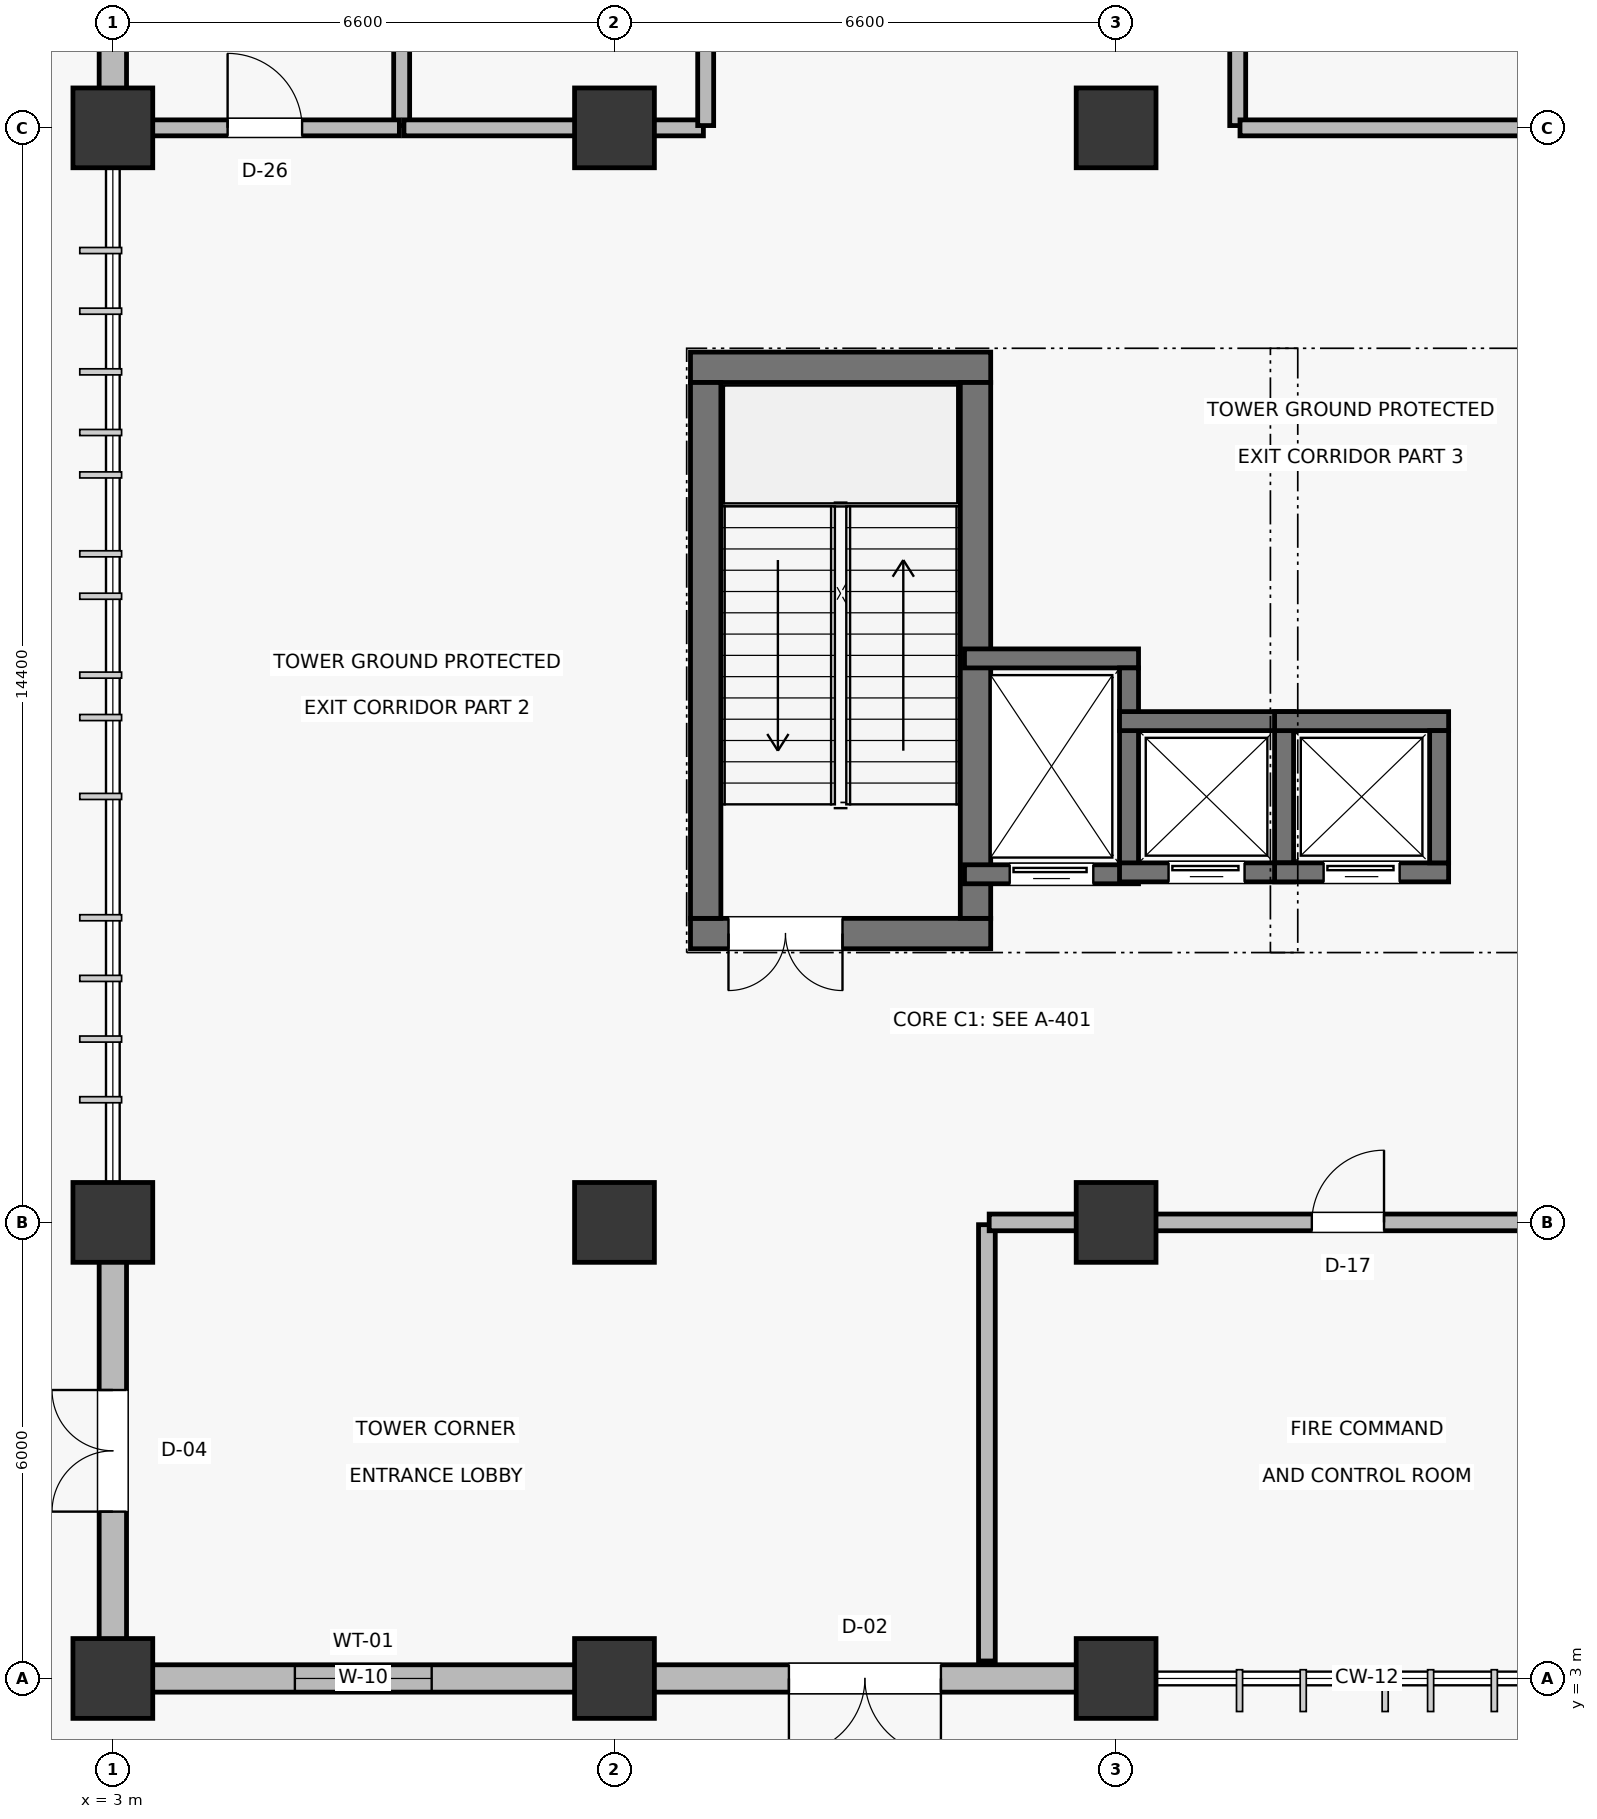
"""IFC4 building model, lengths in metres.
Left out: names, types, materials, properties, quantities, classifications, styles, units other than length and angle.
Written with IfcOpenShell. Run it as: python <this file> out.ifc"""

import sys

from ifc_helpers import new_model, si_unit, direction, frame, frame_2d, origin, origin_2d, place, context, subcontext, project, spatial, rectangle, extrude, element, fill, save


model = new_model("IFC4")
c1 = context("Model", 3, precision=1e-05, world=origin(), true_north=direction((0.0, 1.0)))
c2 = subcontext(c1, "Body", "Model", "MODEL_VIEW")
j1 = project(units=[si_unit("LENGTHUNIT", "METRE"), si_unit("PLANEANGLEUNIT", "RADIAN")], contexts=[c1])
p1 = place(None, origin())
s1 = spatial("IfcSite", under=j1, at=p1, CompositionType="ELEMENT")
p2 = place(p1, origin())
s2 = spatial("IfcBuilding", under=s1, at=p2, CompositionType="ELEMENT")
p3 = place(p2, origin())
s3 = spatial("IfcBuildingStorey", under=s2, at=p3, CompositionType="ELEMENT", Elevation=0.0)
for number, where, z_axis, x_axis in (
    (1, (3.0, 3.0, 0.0), (0.0, 0.0, 1.0), (1.0, 0.0, 0.0)),
    (2, (3.0, 9.0, 0.0), (0.0, 0.0, 1.0), (1.0, 0.0, 0.0)),
    (3, (3.0, 23.4, 0.0), (0.0, 0.0, 1.0), (1.0, 0.0, 0.0)),
    (4, (9.6, 3.0, 0.0), (0.0, 0.0, 1.0), (1.0, 0.0, 0.0)),
    (5, (9.6, 9.0, 0.0), (0.0, 0.0, 1.0), (1.0, 0.0, 0.0)),
    (6, (9.6, 23.4, 0.0), (0.0, 0.0, 1.0), (1.0, 0.0, 0.0)),
    (7, (16.2, 3.0, 0.0), (0.0, 0.0, 1.0), (1.0, 0.0, 0.0)),
    (8, (16.2, 9.0, 0.0), (0.0, 0.0, 1.0), (1.0, 0.0, 0.0)),
    (9, (16.2, 23.4, 0.0), (0.0, 0.0, 1.0), (1.0, 0.0, 0.0)),
):
    element("IfcColumn", number, at=place(p3, frame(where, z_axis=z_axis, x_axis=x_axis)), inside=s3, PredefinedType="COLUMN", context=c2, shape_type="SweptSolid", body=[
        extrude(rectangle(XDim=1.05, YDim=1.05, at=origin_2d()), origin(), (0.0, 0.0, 1.0), 5.4),
    ])
p4 = place(p3, frame((3.505, 3.0, 0.0), z_axis=(0.0, 0.0, 1.0), x_axis=(1.0, 0.0, 0.0)))
e10 = element("IfcWall", 10, at=p4, inside=s3, PredefinedType="SOLIDWALL", context=c2, shape_type="SweptSolid", body=[
    extrude(rectangle(XDim=5.58, YDim=0.36, at=frame_2d((2.79, 0.0))), origin(), (0.0, 0.0, 1.0), 2.87),
])
p5 = place(p4, frame((1.89, 0.0, 0.9)))
e11 = element("IfcOpeningElement", 11, at=p5, cuts=e10, PredefinedType="OPENING", context=c2, shape_type="SweptSolid", body=[
    extrude(rectangle(XDim=1.8, YDim=1.75, at=frame_2d((0.9, 0.875))), frame((0.0, 0.19, 0.0), z_axis=(0.0, -1.0, 0.0), x_axis=(1.0, 0.0, 0.0)), (0.0, 0.0, 1.0), 0.38),
])
p6 = place(p3, frame((10.105, 3.0, 0.0), z_axis=(0.0, 0.0, 1.0), x_axis=(1.0, 0.0, 0.0)))
e12 = element("IfcWall", 12, at=p6, inside=s3, PredefinedType="SOLIDWALL", context=c2, shape_type="SweptSolid", body=[
    extrude(rectangle(XDim=5.58, YDim=0.36, at=frame_2d((2.79, 0.0))), origin(), (0.0, 0.0, 1.0), 4.475),
])
p7 = place(p6, frame((1.79, 0.0, 0.0)))
e13 = element("IfcOpeningElement", 13, at=p7, cuts=e12, PredefinedType="OPENING", context=c2, shape_type="SweptSolid", body=[
    extrude(rectangle(XDim=2.0, YDim=2.4, at=frame_2d((1.0, 1.2))), frame((0.0, 0.19, 0.0), z_axis=(0.0, -1.0, 0.0), x_axis=(1.0, 0.0, 0.0)), (0.0, 0.0, 1.0), 0.38),
])
p8 = place(p3, frame((3.0, 3.505, 0.0), z_axis=(0.0, 0.0, 1.0), x_axis=(0.0, 1.0, 0.0)))
e14 = element("IfcWall", 14, at=p8, inside=s3, PredefinedType="SOLIDWALL", context=c2, shape_type="SweptSolid", body=[
    extrude(rectangle(XDim=4.98, YDim=0.36, at=frame_2d((2.49, 0.0))), origin(), (0.0, 0.0, 1.0), 4.475),
])
p9 = place(p8, frame((1.69, 0.0, 0.0)))
e15 = element("IfcOpeningElement", 15, at=p9, cuts=e14, PredefinedType="OPENING", context=c2, shape_type="SweptSolid", body=[
    extrude(rectangle(XDim=1.6, YDim=2.25, at=frame_2d((0.8, 1.125))), frame((0.0, 0.19, 0.0), z_axis=(0.0, -1.0, 0.0), x_axis=(1.0, 0.0, 0.0)), (0.0, 0.0, 1.0), 0.38),
])
p10 = place(p3, frame((3.0, 23.905, 0.0), z_axis=(0.0, 0.0, 1.0), x_axis=(0.0, 1.0, 0.0)))
e16 = element("IfcWall", 16, at=p10, inside=s3, PredefinedType="SOLIDWALL", context=c2, shape_type="SweptSolid", body=[
    extrude(rectangle(XDim=5.59, YDim=0.36, at=frame_2d((2.795, 0.0))), origin(), (0.0, 0.0, 1.0), 4.475),
])
p11 = place(p10, frame((1.67, 0.0, 0.9)))
e17 = element("IfcOpeningElement", 17, at=p11, cuts=e16, PredefinedType="OPENING", context=c2, shape_type="SweptSolid", body=[
    extrude(rectangle(XDim=2.25, YDim=1.85, at=frame_2d((1.125, 0.925))), frame((0.0, 0.19, 0.0), z_axis=(0.0, -1.0, 0.0), x_axis=(1.0, 0.0, 0.0)), (0.0, 0.0, 1.0), 0.38),
])
p12 = place(p3, frame((10.6, 12.8, 0.0), z_axis=(0.0, 0.0, 1.0), x_axis=(1.0, 0.0, 0.0)))
e18 = element("IfcWall", 18, at=p12, inside=s3, PredefinedType="SHEAR", context=c2, shape_type="SweptSolid", body=[
    extrude(rectangle(XDim=3.95, YDim=0.4, at=frame_2d((1.975, 0.0))), origin(), (0.0, 0.0, 1.0), 5.18),
])
p13 = place(p12, frame((0.5, 0.0, 0.0)))
e19 = element("IfcOpeningElement", 19, at=p13, cuts=e18, PredefinedType="OPENING", context=c2, shape_type="SweptSolid", body=[
    extrude(rectangle(XDim=1.5, YDim=2.2, at=frame_2d((0.75, 1.1))), frame((0.0, 0.21, 0.0), z_axis=(0.0, -1.0, 0.0), x_axis=(1.0, 0.0, 0.0)), (0.0, 0.0, 1.0), 0.42),
])
p14 = place(p3, frame((10.6, 20.25, 0.0), z_axis=(0.0, 0.0, 1.0), x_axis=(1.0, 0.0, 0.0)))
e20 = element("IfcWall", 20, at=p14, inside=s3, PredefinedType="SHEAR", context=c2, shape_type="SweptSolid", body=[
    extrude(rectangle(XDim=3.95, YDim=0.4, at=frame_2d((1.975, 0.0))), origin(), (0.0, 0.0, 1.0), 5.18),
])
for number, where, z_axis, x_axis in (
    (21, (10.8, 13.0, 0.0), (0.0, 0.0, 1.0), (0.0, 1.0, 0.0)),
    (22, (14.35, 13.0, 0.0), (0.0, 0.0, 1.0), (0.0, 1.0, 0.0)),
):
    element("IfcWall", number, at=place(p3, frame(where, z_axis=z_axis, x_axis=x_axis)), inside=s3, PredefinedType="SHEAR", context=c2, shape_type="SweptSolid", body=[
        extrude(rectangle(XDim=7.05, YDim=0.4, at=frame_2d((3.525, 0.0))), origin(), (0.0, 0.0, 1.0), 5.18),
    ])
p15 = place(p3, frame((14.205, 13.58, 0.0), z_axis=(0.0, 0.0, 1.0), x_axis=(1.0, 0.0, 0.0)))
e23 = element("IfcWall", 23, at=p15, inside=s3, PredefinedType="SHEAR", context=c2, shape_type="SweptSolid", body=[
    extrude(rectangle(XDim=2.29, YDim=0.25, at=frame_2d((1.145, 0.0))), origin(), (0.0, 0.0, 1.0), 5.16),
])
p16 = place(p15, frame((0.595, 0.0, 0.0)))
e24 = element("IfcOpeningElement", 24, at=p16, cuts=e23, PredefinedType="OPENING", context=c2, shape_type="SweptSolid", body=[
    extrude(rectangle(XDim=1.1, YDim=2.2, at=frame_2d((0.55, 1.1))), frame((0.0, 0.135, 0.0), z_axis=(0.0, -1.0, 0.0), x_axis=(1.0, 0.0, 0.0)), (0.0, 0.0, 1.0), 0.27),
])
p17 = place(p3, frame((14.205, 16.42, 0.0), z_axis=(0.0, 0.0, 1.0), x_axis=(1.0, 0.0, 0.0)))
e25 = element("IfcWall", 25, at=p17, inside=s3, PredefinedType="SHEAR", context=c2, shape_type="SweptSolid", body=[
    extrude(rectangle(XDim=2.29, YDim=0.25, at=frame_2d((1.145, 0.0))), origin(), (0.0, 0.0, 1.0), 5.16),
])
p18 = place(p3, frame((16.37, 13.705, 0.0), z_axis=(0.0, 0.0, 1.0), x_axis=(0.0, 1.0, 0.0)))
e26 = element("IfcWall", 26, at=p18, inside=s3, PredefinedType="SHEAR", context=c2, shape_type="SweptSolid", body=[
    extrude(rectangle(XDim=2.59, YDim=0.25, at=frame_2d((1.295, 0.0))), origin(), (0.0, 0.0, 1.0), 5.16),
])
p19 = place(p3, frame((16.245, 13.605, 0.0), z_axis=(0.0, 0.0, 1.0), x_axis=(1.0, 0.0, 0.0)))
e27 = element("IfcWall", 27, at=p19, inside=s3, PredefinedType="SHEAR", context=c2, shape_type="SweptSolid", body=[
    extrude(rectangle(XDim=2.29, YDim=0.25, at=frame_2d((1.145, 0.0))), origin(), (0.0, 0.0, 1.0), 5.16),
])
p20 = place(p19, frame((0.645, 0.0, 0.0)))
e28 = element("IfcOpeningElement", 28, at=p20, cuts=e27, PredefinedType="OPENING", context=c2, shape_type="SweptSolid", body=[
    extrude(rectangle(XDim=1.0, YDim=2.15, at=frame_2d((0.5, 1.075))), frame((0.0, 0.135, 0.0), z_axis=(0.0, -1.0, 0.0), x_axis=(1.0, 0.0, 0.0)), (0.0, 0.0, 1.0), 0.27),
])
p21 = place(p3, frame((16.245, 15.595, 0.0), z_axis=(0.0, 0.0, 1.0), x_axis=(1.0, 0.0, 0.0)))
e29 = element("IfcWall", 29, at=p21, inside=s3, PredefinedType="SHEAR", context=c2, shape_type="SweptSolid", body=[
    extrude(rectangle(XDim=2.29, YDim=0.25, at=frame_2d((1.145, 0.0))), origin(), (0.0, 0.0, 1.0), 5.16),
])
p22 = place(p3, frame((18.41, 13.73, 0.0), z_axis=(0.0, 0.0, 1.0), x_axis=(0.0, 1.0, 0.0)))
e30 = element("IfcWall", 30, at=p22, inside=s3, PredefinedType="SHEAR", context=c2, shape_type="SweptSolid", body=[
    extrude(rectangle(XDim=1.74, YDim=0.25, at=frame_2d((0.87, 0.0))), origin(), (0.0, 0.0, 1.0), 5.16),
])
p23 = place(p3, frame((18.285, 13.605, 0.0), z_axis=(0.0, 0.0, 1.0), x_axis=(1.0, 0.0, 0.0)))
e31 = element("IfcWall", 31, at=p23, inside=s3, PredefinedType="SHEAR", context=c2, shape_type="SweptSolid", body=[
    extrude(rectangle(XDim=2.29, YDim=0.25, at=frame_2d((1.145, 0.0))), origin(), (0.0, 0.0, 1.0), 5.16),
])
p24 = place(p23, frame((0.645, 0.0, 0.0)))
e32 = element("IfcOpeningElement", 32, at=p24, cuts=e31, PredefinedType="OPENING", context=c2, shape_type="SweptSolid", body=[
    extrude(rectangle(XDim=1.0, YDim=2.15, at=frame_2d((0.5, 1.075))), frame((0.0, 0.135, 0.0), z_axis=(0.0, -1.0, 0.0), x_axis=(1.0, 0.0, 0.0)), (0.0, 0.0, 1.0), 0.27),
])
p25 = place(p3, frame((18.285, 15.595, 0.0), z_axis=(0.0, 0.0, 1.0), x_axis=(1.0, 0.0, 0.0)))
e33 = element("IfcWall", 33, at=p25, inside=s3, PredefinedType="SHEAR", context=c2, shape_type="SweptSolid", body=[
    extrude(rectangle(XDim=2.29, YDim=0.25, at=frame_2d((1.145, 0.0))), origin(), (0.0, 0.0, 1.0), 5.16),
])
p26 = place(p3, frame((20.45, 13.73, 0.0), z_axis=(0.0, 0.0, 1.0), x_axis=(0.0, 1.0, 0.0)))
e34 = element("IfcWall", 34, at=p26, inside=s3, PredefinedType="SHEAR", context=c2, shape_type="SweptSolid", body=[
    extrude(rectangle(XDim=1.74, YDim=0.25, at=frame_2d((0.87, 0.0))), origin(), (0.0, 0.0, 1.0), 5.16),
])
p27 = place(p3, frame((14.5, 3.23, 0.0), z_axis=(0.0, 0.0, 1.0), x_axis=(0.0, 1.0, 0.0)))
e35 = element("IfcWall", 35, at=p27, inside=s3, PredefinedType="PARTITIONING", context=c2, shape_type="SweptSolid", body=[
    extrude(rectangle(XDim=5.74, YDim=0.22, at=frame_2d((2.87, 0.0))), origin(), (0.0, 0.0, 1.0), 4.425),
])
p28 = place(p3, frame((14.53, 9.0, 0.0), z_axis=(0.0, 0.0, 1.0), x_axis=(1.0, 0.0, 0.0)))
e36 = element("IfcWall", 36, at=p28, inside=s3, PredefinedType="PARTITIONING", context=c2, shape_type="SweptSolid", body=[
    extrude(rectangle(XDim=9.44, YDim=0.22, at=frame_2d((4.72, 0.0))), origin(), (0.0, 0.0, 1.0), 4.255),
])
p29 = place(p28, frame((4.245, 0.0, 0.0)))
e37 = element("IfcOpeningElement", 37, at=p29, cuts=e36, PredefinedType="OPENING", context=c2, shape_type="SweptSolid", body=[
    extrude(rectangle(XDim=0.95, YDim=2.15, at=frame_2d((0.475, 1.075))), frame((0.0, 0.12, 0.0), z_axis=(0.0, -1.0, 0.0), x_axis=(1.0, 0.0, 0.0)), (0.0, 0.0, 1.0), 0.24),
])
p30 = place(p3, frame((6.8, 23.43, 0.0), z_axis=(0.0, 0.0, 1.0), x_axis=(0.0, 1.0, 0.0)))
e38 = element("IfcWall", 38, at=p30, inside=s3, PredefinedType="PLUMBINGWALL", context=c2, shape_type="SweptSolid", body=[
    extrude(rectangle(XDim=6.54, YDim=0.21, at=frame_2d((3.27, 0.0))), origin(), (0.0, 0.0, 1.0), 4.325),
])
p31 = place(p3, frame((3.23, 23.4, 0.0), z_axis=(0.0, 0.0, 1.0), x_axis=(1.0, 0.0, 0.0)))
e39 = element("IfcWall", 39, at=p31, inside=s3, PredefinedType="PLUMBINGWALL", context=c2, shape_type="SweptSolid", body=[
    extrude(rectangle(XDim=3.54, YDim=0.21, at=frame_2d((1.77, 0.0))), origin(), (0.0, 0.0, 1.0), 4.595),
])
p32 = place(p31, frame((1.28, 0.0, 0.0)))
e40 = element("IfcOpeningElement", 40, at=p32, cuts=e39, PredefinedType="OPENING", context=c2, shape_type="SweptSolid", body=[
    extrude(rectangle(XDim=0.98, YDim=2.1, at=frame_2d((0.49, 1.05))), frame((0.0, 0.115, 0.0), z_axis=(0.0, -1.0, 0.0), x_axis=(1.0, 0.0, 0.0)), (0.0, 0.0, 1.0), 0.23),
])
p33 = place(p3, frame((6.83, 23.4, 0.0), z_axis=(0.0, 0.0, 1.0), x_axis=(1.0, 0.0, 0.0)))
e41 = element("IfcWall", 41, at=p33, inside=s3, PredefinedType="PLUMBINGWALL", context=c2, shape_type="SweptSolid", body=[
    extrude(rectangle(XDim=3.94, YDim=0.21, at=frame_2d((1.97, 0.0))), origin(), (0.0, 0.0, 1.0), 4.425),
])
p34 = place(p3, frame((10.8, 23.43, 0.0), z_axis=(0.0, 0.0, 1.0), x_axis=(0.0, 1.0, 0.0)))
e42 = element("IfcWall", 42, at=p34, inside=s3, PredefinedType="PLUMBINGWALL", context=c2, shape_type="SweptSolid", body=[
    extrude(rectangle(XDim=6.54, YDim=0.21, at=frame_2d((3.27, 0.0))), origin(), (0.0, 0.0, 1.0), 4.215),
])
p35 = place(p34, frame((2.81, 0.0, 0.0)))
e43 = element("IfcOpeningElement", 43, at=p35, cuts=e42, PredefinedType="OPENING", context=c2, shape_type="SweptSolid", body=[
    extrude(rectangle(XDim=0.92, YDim=2.1, at=frame_2d((0.46, 1.05))), frame((0.0, 0.115, 0.0), z_axis=(0.0, -1.0, 0.0), x_axis=(1.0, 0.0, 0.0)), (0.0, 0.0, 1.0), 0.23),
])
p36 = place(p3, frame((17.8, 23.43, 0.0), z_axis=(0.0, 0.0, 1.0), x_axis=(0.0, 1.0, 0.0)))
e44 = element("IfcWall", 44, at=p36, inside=s3, PredefinedType="PLUMBINGWALL", context=c2, shape_type="SweptSolid", body=[
    extrude(rectangle(XDim=6.54, YDim=0.21, at=frame_2d((3.27, 0.0))), origin(), (0.0, 0.0, 1.0), 4.325),
])
p37 = place(p36, frame((2.81, 0.0, 0.0)))
e45 = element("IfcOpeningElement", 45, at=p37, cuts=e44, PredefinedType="OPENING", context=c2, shape_type="SweptSolid", body=[
    extrude(rectangle(XDim=0.92, YDim=2.1, at=frame_2d((0.46, 1.05))), frame((0.0, 0.115, 0.0), z_axis=(0.0, -1.0, 0.0), x_axis=(1.0, 0.0, 0.0)), (0.0, 0.0, 1.0), 0.23),
])
p38 = place(p3, frame((17.83, 23.4, 0.0), z_axis=(0.0, 0.0, 1.0), x_axis=(1.0, 0.0, 0.0)))
e46 = element("IfcWall", 46, at=p38, inside=s3, PredefinedType="PLUMBINGWALL", context=c2, shape_type="SweptSolid", body=[
    extrude(rectangle(XDim=6.14, YDim=0.21, at=frame_2d((3.07, 0.0))), origin(), (0.0, 0.0, 1.0), 4.425),
])
p39 = place(p5, frame((1.8, 0.0, 0.0), z_axis=(0.0, 0.0, 1.0), x_axis=(-1.0, 0.0, 0.0)))
e47 = element("IfcWindow", 47, at=p39, inside=s3, PartitioningType="DOUBLE_PANEL_HORIZONTAL", PredefinedType="WINDOW", context=c2, shape_type="SweptSolid", body=[
    extrude(rectangle(XDim=1.8, YDim=1.75, at=frame_2d((0.9, 0.875))), frame((0.0, 0.03, 0.0), z_axis=(0.0, -1.0, 0.0), x_axis=(1.0, 0.0, 0.0)), (0.0, 0.0, 1.0), 0.06),
])
fill(e11, e47)
p40 = place(p7, frame((2.0, 0.0, 0.0), z_axis=(0.0, 0.0, 1.0), x_axis=(-1.0, 0.0, 0.0)))
e48 = element("IfcDoor", 48, at=p40, inside=s3, OperationType="DOUBLE_DOOR_SINGLE_SWING", PredefinedType="DOOR", context=c2, shape_type="SweptSolid", body=[
    extrude(rectangle(XDim=2.0, YDim=2.4, at=frame_2d((1.0, 1.2))), frame((0.0, 0.025, 0.0), z_axis=(0.0, -1.0, 0.0), x_axis=(1.0, 0.0, 0.0)), (0.0, 0.0, 1.0), 0.05),
])
fill(e13, e48)
p41 = place(p9, origin())
e49 = element("IfcDoor", 49, at=p41, inside=s3, OperationType="DOUBLE_DOOR_SINGLE_SWING", PredefinedType="DOOR", context=c2, shape_type="SweptSolid", body=[
    extrude(rectangle(XDim=1.6, YDim=2.25, at=frame_2d((0.8, 1.125))), frame((0.0, 0.025, 0.0), z_axis=(0.0, -1.0, 0.0), x_axis=(1.0, 0.0, 0.0)), (0.0, 0.0, 1.0), 0.05),
])
fill(e15, e49)
p42 = place(p13, frame((1.5, 0.0, 0.0), z_axis=(0.0, 0.0, 1.0), x_axis=(-1.0, 0.0, 0.0)))
e50 = element("IfcDoor", 50, at=p42, inside=s3, OperationType="DOUBLE_DOOR_SINGLE_SWING", PredefinedType="DOOR", context=c2, shape_type="SweptSolid", body=[
    extrude(rectangle(XDim=1.5, YDim=2.2, at=frame_2d((0.75, 1.1))), frame((0.0, 0.025, 0.0), z_axis=(0.0, -1.0, 0.0), x_axis=(1.0, 0.0, 0.0)), (0.0, 0.0, 1.0), 0.05),
])
fill(e19, e50)
p43 = place(p16, frame((1.1, 0.0, 0.0), z_axis=(0.0, 0.0, 1.0), x_axis=(-1.0, 0.0, 0.0)))
e51 = element("IfcDoor", 51, at=p43, inside=s3, OperationType="SLIDING_TO_LEFT", PredefinedType="DOOR", context=c2, shape_type="SweptSolid", body=[
    extrude(rectangle(XDim=1.1, YDim=2.2, at=frame_2d((0.55, 1.1))), frame((0.0, 0.025, 0.0), z_axis=(0.0, -1.0, 0.0), x_axis=(1.0, 0.0, 0.0)), (0.0, 0.0, 1.0), 0.05),
])
fill(e24, e51)
p44 = place(p20, frame((1.0, 0.0, 0.0), z_axis=(0.0, 0.0, 1.0), x_axis=(-1.0, 0.0, 0.0)))
e52 = element("IfcDoor", 52, at=p44, inside=s3, OperationType="SLIDING_TO_LEFT", PredefinedType="DOOR", context=c2, shape_type="SweptSolid", body=[
    extrude(rectangle(XDim=1.0, YDim=2.15, at=frame_2d((0.5, 1.075))), frame((0.0, 0.025, 0.0), z_axis=(0.0, -1.0, 0.0), x_axis=(1.0, 0.0, 0.0)), (0.0, 0.0, 1.0), 0.05),
])
fill(e28, e52)
p45 = place(p24, frame((1.0, 0.0, 0.0), z_axis=(0.0, 0.0, 1.0), x_axis=(-1.0, 0.0, 0.0)))
e53 = element("IfcDoor", 53, at=p45, inside=s3, OperationType="SLIDING_TO_LEFT", PredefinedType="DOOR", context=c2, shape_type="SweptSolid", body=[
    extrude(rectangle(XDim=1.0, YDim=2.15, at=frame_2d((0.5, 1.075))), frame((0.0, 0.025, 0.0), z_axis=(0.0, -1.0, 0.0), x_axis=(1.0, 0.0, 0.0)), (0.0, 0.0, 1.0), 0.05),
])
fill(e32, e53)
p46 = place(p29, origin())
e54 = element("IfcDoor", 54, at=p46, inside=s3, OperationType="SINGLE_SWING_RIGHT", PredefinedType="DOOR", context=c2, shape_type="SweptSolid", body=[
    extrude(rectangle(XDim=0.95, YDim=2.15, at=frame_2d((0.475, 1.075))), frame((0.0, 0.025, 0.0), z_axis=(0.0, -1.0, 0.0), x_axis=(1.0, 0.0, 0.0)), (0.0, 0.0, 1.0), 0.05),
])
fill(e37, e54)
p47 = place(p32, origin())
e55 = element("IfcDoor", 55, at=p47, inside=s3, OperationType="SINGLE_SWING_LEFT", PredefinedType="DOOR", context=c2, shape_type="SweptSolid", body=[
    extrude(rectangle(XDim=0.98, YDim=2.1, at=frame_2d((0.49, 1.05))), frame((0.0, 0.025, 0.0), z_axis=(0.0, -1.0, 0.0), x_axis=(1.0, 0.0, 0.0)), (0.0, 0.0, 1.0), 0.05),
])
fill(e40, e55)
save(model, sys.argv[1])
